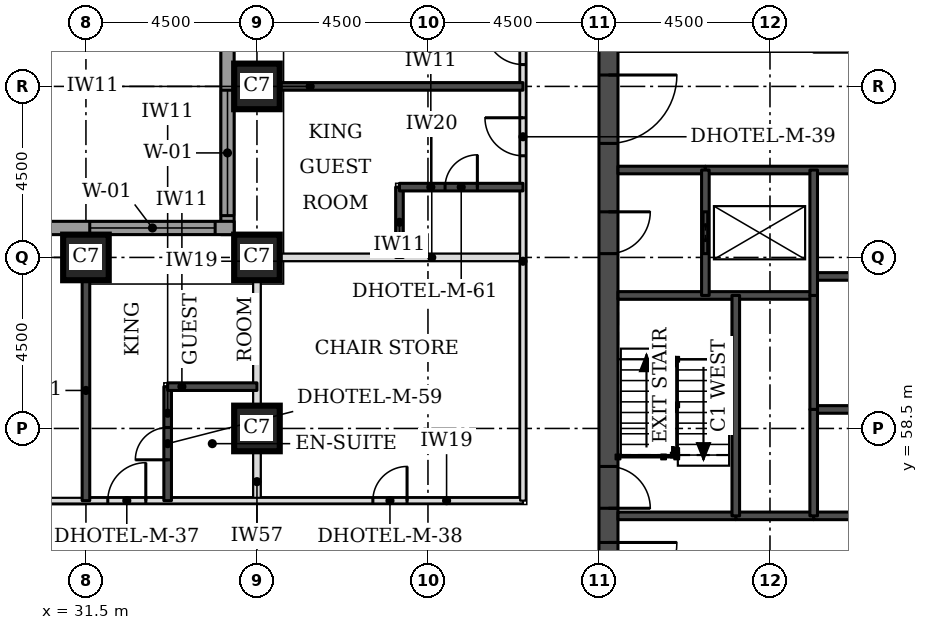
"""IFC4 building model, lengths in metres.
Left out: names, types, materials, properties, quantities, classifications, styles, units other than length and angle.
Written with IfcOpenShell. Run it as: python <this file> out.ifc"""

import sys

from ifc_helpers import new_model, si_unit, direction, frame, frame_2d, origin, origin_2d, place, context, subcontext, project, spatial, rectangle, extrude, element, fill, save


model = new_model("IFC4")
c1 = context("Model", 3, precision=1e-05, world=origin(), true_north=direction((0.0, 1.0)))
c2 = subcontext(c1, "Body", "Model", "MODEL_VIEW")
j1 = project(units=[si_unit("LENGTHUNIT", "METRE"), si_unit("PLANEANGLEUNIT", "RADIAN")], contexts=[c1])
p1 = place(None, origin())
s1 = spatial("IfcSite", under=j1, at=p1, CompositionType="ELEMENT")
p2 = place(p1, origin())
s2 = spatial("IfcBuilding", under=s1, at=p2, CompositionType="ELEMENT")
p3 = place(p2, frame((0.0, 0.0, 23.1)))
s3 = spatial("IfcBuildingStorey", under=s2, at=p3, CompositionType="ELEMENT", Elevation=23.1)
for number, where, z_axis, x_axis in (
    (1, (36.0, 58.5, 0.0), (0.0, 0.0, 1.0), (1.0, 0.0, 0.0)),
    (2, (31.5, 63.0, 0.0), (0.0, 0.0, 1.0), (1.0, 0.0, 0.0)),
    (3, (36.0, 63.0, 0.0), (0.0, 0.0, 1.0), (1.0, 0.0, 0.0)),
    (4, (36.0, 67.5, 0.0), (0.0, 0.0, 1.0), (1.0, 0.0, 0.0)),
):
    element("IfcColumn", number, at=place(p3, frame(where, z_axis=z_axis, x_axis=x_axis)), inside=s3, PredefinedType="COLUMN", context=c2, shape_type="SweptSolid", body=[
        extrude(rectangle(XDim=1.2, YDim=1.2, at=origin_2d()), origin(), (0.0, 0.0, 1.0), 3.3),
    ])
p4 = place(p3, frame((45.25, 49.5, 0.0), z_axis=(0.0, 0.0, 1.0), x_axis=(0.0, 1.0, 0.0)))
e5 = element("IfcWall", 5, at=p4, inside=s3, PredefinedType="SHEAR", context=c2, shape_type="SweptSolid", body=[
    extrude(rectangle(XDim=22.5, YDim=0.5, at=frame_2d((11.25, 0.0))), origin(), (0.0, 0.0, 1.0), 3.3),
])
p5 = place(p4, frame((4.2, 0.0, 0.0)))
e6 = element("IfcOpeningElement", 6, at=p5, cuts=e5, PredefinedType="OPENING", context=c2, shape_type="SweptSolid", body=[
    extrude(rectangle(XDim=1.8, YDim=2.1, at=frame_2d((0.9, 1.05))), frame((0.0, 0.26, 0.0), z_axis=(0.0, -1.0, 0.0), x_axis=(1.0, 0.0, 0.0)), (0.0, 0.0, 1.0), 0.52),
])
p6 = place(p4, frame((6.9, 0.0, 0.0)))
e7 = element("IfcOpeningElement", 7, at=p6, cuts=e5, PredefinedType="OPENING", context=c2, shape_type="SweptSolid", body=[
    extrude(rectangle(XDim=1.1, YDim=2.1, at=frame_2d((0.55, 1.05))), frame((0.0, 0.26, 0.0), z_axis=(0.0, -1.0, 0.0), x_axis=(1.0, 0.0, 0.0)), (0.0, 0.0, 1.0), 0.52),
])
p7 = place(p4, frame((13.6, 0.0, 0.0)))
e8 = element("IfcOpeningElement", 8, at=p7, cuts=e5, PredefinedType="OPENING", context=c2, shape_type="SweptSolid", body=[
    extrude(rectangle(XDim=1.1, YDim=2.1, at=frame_2d((0.55, 1.05))), frame((0.0, 0.26, 0.0), z_axis=(0.0, -1.0, 0.0), x_axis=(1.0, 0.0, 0.0)), (0.0, 0.0, 1.0), 0.52),
])
p8 = place(p4, frame((16.5, 0.0, 0.0)))
e9 = element("IfcOpeningElement", 9, at=p8, cuts=e5, PredefinedType="OPENING", context=c2, shape_type="SweptSolid", body=[
    extrude(rectangle(XDim=1.8, YDim=2.1, at=frame_2d((0.9, 1.05))), frame((0.0, 0.26, 0.0), z_axis=(0.0, -1.0, 0.0), x_axis=(1.0, 0.0, 0.0)), (0.0, 0.0, 1.0), 0.52),
])
p9 = place(p3, frame((35.225, 76.894, 0.0), z_axis=(0.0, 0.0, 1.0), x_axis=(0.0, -1.0, 0.0)))
e10 = element("IfcWall", 10, at=p9, inside=s3, PredefinedType="STANDARD", context=c2, shape_type="SweptSolid", body=[
    extrude(rectangle(XDim=13.293, YDim=0.35, at=frame_2d((6.647, 0.0))), origin(), (0.0, 0.0, 1.0), 3.055),
])
p10 = place(p9, frame((9.493, 0.0, 0.8)))
e11 = element("IfcOpeningElement", 11, at=p10, cuts=e10, PredefinedType="OPENING", context=c2, shape_type="SweptSolid", body=[
    extrude(rectangle(XDim=3.3, YDim=1.5, at=frame_2d((1.65, 0.75))), frame((0.0, 0.185, 0.0), z_axis=(0.0, -1.0, 0.0), x_axis=(1.0, 0.0, 0.0)), (0.0, 0.0, 1.0), 0.37),
])
p11 = place(p3, frame((35.4, 63.775, 0.0), z_axis=(0.0, 0.0, 1.0), x_axis=(-1.0, 0.0, 0.0)))
e12 = element("IfcWall", 12, at=p11, inside=s3, PredefinedType="STANDARD", context=c2, shape_type="SweptSolid", body=[
    extrude(rectangle(XDim=17.793, YDim=0.35, at=frame_2d((8.897, 0.0))), origin(), (0.0, 0.0, 1.0), 3.055),
])
p12 = place(p11, frame((0.5, 0.0, 0.8)))
e13 = element("IfcOpeningElement", 13, at=p12, cuts=e12, PredefinedType="OPENING", context=c2, shape_type="SweptSolid", body=[
    extrude(rectangle(XDim=3.3, YDim=1.5, at=frame_2d((1.65, 0.75))), frame((0.0, 0.185, 0.0), z_axis=(0.0, -1.0, 0.0), x_axis=(1.0, 0.0, 0.0)), (0.0, 0.0, 1.0), 0.37),
])
p13 = place(p11, frame((9.0, 0.0, 0.8)))
e14 = element("IfcOpeningElement", 14, at=p13, cuts=e12, PredefinedType="OPENING", context=c2, shape_type="SweptSolid", body=[
    extrude(rectangle(XDim=3.3, YDim=1.5, at=frame_2d((1.65, 0.75))), frame((0.0, 0.185, 0.0), z_axis=(0.0, -1.0, 0.0), x_axis=(1.0, 0.0, 0.0)), (0.0, 0.0, 1.0), 0.37),
])
p14 = place(p3, frame((36.0, 56.6, 0.0), z_axis=(0.0, 0.0, 1.0), x_axis=(0.0, 1.0, 0.0)))
e15 = element("IfcWall", 15, at=p14, inside=s3, PredefinedType="PARTITIONING", context=c2, shape_type="SweptSolid", body=[
    extrude(rectangle(XDim=5.8, YDim=0.2, at=frame_2d((2.9, 0.0))), origin(), (0.0, 0.0, 1.0), 2.33),
])
p15 = place(p3, frame((36.6, 63.0, 0.0), z_axis=(0.0, 0.0, 1.0), x_axis=(1.0, 0.0, 0.0)))
e16 = element("IfcWall", 16, at=p15, inside=s3, PredefinedType="PARTITIONING", context=c2, shape_type="SweptSolid", body=[
    extrude(rectangle(XDim=6.4, YDim=0.2, at=frame_2d((3.2, 0.0))), origin(), (0.0, 0.0, 1.0), 3.08),
])
p16 = place(p3, frame((29.38, 56.6, 0.0), z_axis=(0.0, 0.0, 1.0), x_axis=(1.0, 0.0, 0.0)))
e17 = element("IfcWall", 17, at=p16, inside=s3, PredefinedType="PARTITIONING", context=c2, shape_type="SweptSolid", body=[
    extrude(rectangle(XDim=13.62, YDim=0.15, at=frame_2d((6.81, 0.0))), origin(), (0.0, 0.0, 1.0), 3.08),
])
p17 = place(p16, frame((2.695, 0.0, 0.0)))
e18 = element("IfcOpeningElement", 18, at=p17, cuts=e17, PredefinedType="OPENING", context=c2, shape_type="SweptSolid", body=[
    extrude(rectangle(XDim=1.0, YDim=2.1, at=frame_2d((0.5, 1.05))), frame((0.0, 0.085, 0.0), z_axis=(0.0, -1.0, 0.0), x_axis=(1.0, 0.0, 0.0)), (0.0, 0.0, 1.0), 0.17),
])
p18 = place(p16, frame((9.67, 0.0, 0.0)))
e19 = element("IfcOpeningElement", 19, at=p18, cuts=e17, PredefinedType="OPENING", context=c2, shape_type="SweptSolid", body=[
    extrude(rectangle(XDim=0.9, YDim=2.1, at=frame_2d((0.45, 1.05))), frame((0.0, 0.085, 0.0), z_axis=(0.0, -1.0, 0.0), x_axis=(1.0, 0.0, 0.0)), (0.0, 0.0, 1.0), 0.17),
])
p19 = place(p3, frame((43.0, 56.6, 0.0), z_axis=(0.0, 0.0, 1.0), x_axis=(0.0, 1.0, 0.0)))
e20 = element("IfcWall", 20, at=p19, inside=s3, PredefinedType="PARTITIONING", context=c2, shape_type="SweptSolid", body=[
    extrude(rectangle(XDim=17.4, YDim=0.15, at=frame_2d((8.7, 0.0))), origin(), (0.0, 0.0, 1.0), 3.08),
])
p20 = place(p19, frame((9.075, 0.0, 0.0)))
e21 = element("IfcOpeningElement", 21, at=p20, cuts=e20, PredefinedType="OPENING", context=c2, shape_type="SweptSolid", body=[
    extrude(rectangle(XDim=1.0, YDim=2.1, at=frame_2d((0.5, 1.05))), frame((0.0, 0.085, 0.0), z_axis=(0.0, -1.0, 0.0), x_axis=(1.0, 0.0, 0.0)), (0.0, 0.0, 1.0), 0.17),
])
p21 = place(p19, frame((11.475, 0.0, 0.0)))
e22 = element("IfcOpeningElement", 22, at=p21, cuts=e20, PredefinedType="OPENING", context=c2, shape_type="SweptSolid", body=[
    extrude(rectangle(XDim=1.0, YDim=2.1, at=frame_2d((0.5, 1.05))), frame((0.0, 0.085, 0.0), z_axis=(0.0, -1.0, 0.0), x_axis=(1.0, 0.0, 0.0)), (0.0, 0.0, 1.0), 0.17),
])
p22 = place(p19, frame((15.953, 0.0, 0.0)))
e23 = element("IfcOpeningElement", 23, at=p22, cuts=e20, PredefinedType="OPENING", context=c2, shape_type="SweptSolid", body=[
    extrude(rectangle(XDim=1.0, YDim=2.1, at=frame_2d((0.5, 1.05))), frame((0.0, 0.085, 0.0), z_axis=(0.0, -1.0, 0.0), x_axis=(1.0, 0.0, 0.0)), (0.0, 0.0, 1.0), 0.17),
])
p23 = place(p3, frame((31.5, 56.6, 0.0), z_axis=(0.0, 0.0, 1.0), x_axis=(0.0, 1.0, 0.0)))
e24 = element("IfcWall", 24, at=p23, inside=s3, PredefinedType="SOLIDWALL", context=c2, shape_type="SweptSolid", body=[
    extrude(rectangle(XDim=5.8, YDim=0.2, at=frame_2d((2.9, 0.0))), origin(), (0.0, 0.0, 1.0), 3.08),
])
p24 = place(p3, frame((33.65, 56.6, 0.0), z_axis=(0.0, 0.0, 1.0), x_axis=(0.0, 1.0, 0.0)))
e25 = element("IfcWall", 25, at=p24, inside=s3, PredefinedType="SOLIDWALL", context=c2, shape_type="SweptSolid", body=[
    extrude(rectangle(XDim=3.0, YDim=0.2, at=frame_2d((1.5, 0.0))), origin(), (0.0, 0.0, 1.0), 3.08),
])
p25 = place(p24, frame((1.075, 0.0, 0.0)))
e26 = element("IfcOpeningElement", 26, at=p25, cuts=e25, PredefinedType="OPENING", context=c2, shape_type="SweptSolid", body=[
    extrude(rectangle(XDim=0.85, YDim=2.1, at=frame_2d((0.425, 1.05))), frame((0.0, 0.11, 0.0), z_axis=(0.0, -1.0, 0.0), x_axis=(1.0, 0.0, 0.0)), (0.0, 0.0, 1.0), 0.22),
])
p26 = place(p3, frame((33.65, 59.6, 0.0), z_axis=(0.0, 0.0, 1.0), x_axis=(1.0, 0.0, 0.0)))
e27 = element("IfcWall", 27, at=p26, inside=s3, PredefinedType="SOLIDWALL", context=c2, shape_type="SweptSolid", body=[
    extrude(rectangle(XDim=2.35, YDim=0.2, at=frame_2d((1.175, 0.0))), origin(), (0.0, 0.0, 1.0), 3.08),
])
p27 = place(p3, frame((39.75, 63.0, 0.0), z_axis=(0.0, 0.0, 1.0), x_axis=(0.0, 1.0, 0.0)))
e28 = element("IfcWall", 28, at=p27, inside=s3, PredefinedType="SOLIDWALL", context=c2, shape_type="SweptSolid", body=[
    extrude(rectangle(XDim=1.85, YDim=0.2, at=frame_2d((0.925, 0.0))), origin(), (0.0, 0.0, 1.0), 3.08),
])
p28 = place(p3, frame((39.75, 64.85, 0.0), z_axis=(0.0, 0.0, 1.0), x_axis=(1.0, 0.0, 0.0)))
e29 = element("IfcWall", 29, at=p28, inside=s3, PredefinedType="SOLIDWALL", context=c2, shape_type="SweptSolid", body=[
    extrude(rectangle(XDim=3.25, YDim=0.2, at=frame_2d((1.625, 0.0))), origin(), (0.0, 0.0, 1.0), 3.08),
])
p29 = place(p28, frame((1.2, 0.0, 0.0)))
e30 = element("IfcOpeningElement", 30, at=p29, cuts=e29, PredefinedType="OPENING", context=c2, shape_type="SweptSolid", body=[
    extrude(rectangle(XDim=0.85, YDim=2.1, at=frame_2d((0.425, 1.05))), frame((0.0, 0.11, 0.0), z_axis=(0.0, -1.0, 0.0), x_axis=(1.0, 0.0, 0.0)), (0.0, 0.0, 1.0), 0.22),
])
p30 = place(p3, frame((36.6, 67.5, 0.0), z_axis=(0.0, 0.0, 1.0), x_axis=(1.0, 0.0, 0.0)))
e31 = element("IfcWall", 31, at=p30, inside=s3, PredefinedType="SOLIDWALL", context=c2, shape_type="SweptSolid", body=[
    extrude(rectangle(XDim=6.4, YDim=0.2, at=frame_2d((3.2, 0.0))), origin(), (0.0, 0.0, 1.0), 3.08),
])
p31 = place(p3, frame((48.6, 56.2, 0.0), z_axis=(0.0, 0.0, 1.0), x_axis=(1.0, 0.0, 0.0)))
e32 = element("IfcWall", 32, at=p31, inside=s3, PredefinedType="SOLIDWALL", context=c2, shape_type="SweptSolid", body=[
    extrude(rectangle(XDim=2.05, YDim=0.2, at=frame_2d((1.025, 0.0))), origin(), (0.0, 0.0, 1.0), 3.08),
])
p32 = place(p3, frame((45.5, 56.2, 0.0), z_axis=(0.0, 0.0, 1.0), x_axis=(1.0, 0.0, 0.0)))
e33 = element("IfcWall", 33, at=p32, inside=s3, PredefinedType="SOLIDWALL", context=c2, shape_type="SweptSolid", body=[
    extrude(rectangle(XDim=3.1, YDim=0.2, at=frame_2d((1.55, 0.0))), origin(), (0.0, 0.0, 1.0), 3.08),
])
p33 = place(p3, frame((50.65, 56.2, 0.0), z_axis=(0.0, 0.0, 1.0), x_axis=(1.0, 0.0, 0.0)))
e34 = element("IfcWall", 34, at=p33, inside=s3, PredefinedType="SOLIDWALL", context=c2, shape_type="SweptSolid", body=[
    extrude(rectangle(XDim=11.2, YDim=0.2, at=frame_2d((5.6, 0.0))), origin(), (0.0, 0.0, 1.0), 3.08),
])
p34 = place(p3, frame((50.65, 59.0, 0.0), z_axis=(0.0, 0.0, 1.0), x_axis=(1.0, 0.0, 0.0)))
e35 = element("IfcWall", 35, at=p34, inside=s3, PredefinedType="SOLIDWALL", context=c2, shape_type="SweptSolid", body=[
    extrude(rectangle(XDim=11.2, YDim=0.2, at=frame_2d((5.6, 0.0))), origin(), (0.0, 0.0, 1.0), 3.3),
])
p35 = place(p3, frame((45.5, 62.0, 0.0), z_axis=(0.0, 0.0, 1.0), x_axis=(1.0, 0.0, 0.0)))
e36 = element("IfcWall", 36, at=p35, inside=s3, PredefinedType="SOLIDWALL", context=c2, shape_type="SweptSolid", body=[
    extrude(rectangle(XDim=5.15, YDim=0.2, at=frame_2d((2.575, 0.0))), origin(), (0.0, 0.0, 1.0), 3.08),
])
p36 = place(p3, frame((50.65, 62.5, 0.0), z_axis=(0.0, 0.0, 1.0), x_axis=(1.0, 0.0, 0.0)))
e37 = element("IfcWall", 37, at=p36, inside=s3, PredefinedType="SOLIDWALL", context=c2, shape_type="SweptSolid", body=[
    extrude(rectangle(XDim=11.2, YDim=0.2, at=frame_2d((5.6, 0.0))), origin(), (0.0, 0.0, 1.0), 3.3),
])
p37 = place(p3, frame((45.5, 65.3, 0.0), z_axis=(0.0, 0.0, 1.0), x_axis=(1.0, 0.0, 0.0)))
e38 = element("IfcWall", 38, at=p37, inside=s3, PredefinedType="SOLIDWALL", context=c2, shape_type="SweptSolid", body=[
    extrude(rectangle(XDim=2.3, YDim=0.2, at=frame_2d((1.15, 0.0))), origin(), (0.0, 0.0, 1.0), 3.08),
])
p38 = place(p3, frame((47.8, 65.3, 0.0), z_axis=(0.0, 0.0, 1.0), x_axis=(1.0, 0.0, 0.0)))
e39 = element("IfcWall", 39, at=p38, inside=s3, PredefinedType="SOLIDWALL", context=c2, shape_type="SweptSolid", body=[
    extrude(rectangle(XDim=16.9, YDim=0.2, at=frame_2d((8.45, 0.0))), origin(), (0.0, 0.0, 1.0), 3.08),
])
p39 = place(p3, frame((47.8, 62.0, 0.0), z_axis=(0.0, 0.0, 1.0), x_axis=(0.0, 1.0, 0.0)))
e40 = element("IfcWall", 40, at=p39, inside=s3, PredefinedType="SOLIDWALL", context=c2, shape_type="SweptSolid", body=[
    extrude(rectangle(XDim=3.3, YDim=0.2, at=frame_2d((1.65, 0.0))), origin(), (0.0, 0.0, 1.0), 3.08),
])
p40 = place(p39, frame((1.1, 0.0, 0.0)))
e41 = element("IfcOpeningElement", 41, at=p40, cuts=e40, PredefinedType="OPENING", context=c2, shape_type="SweptSolid", body=[
    extrude(rectangle(XDim=1.1, YDim=2.1, at=frame_2d((0.55, 1.05))), frame((0.0, 0.11, 0.0), z_axis=(0.0, -1.0, 0.0), x_axis=(1.0, 0.0, 0.0)), (0.0, 0.0, 1.0), 0.22),
])
p41 = place(p3, frame((48.6, 56.2, 0.0), z_axis=(0.0, 0.0, 1.0), x_axis=(0.0, 1.0, 0.0)))
e42 = element("IfcWall", 42, at=p41, inside=s3, PredefinedType="SOLIDWALL", context=c2, shape_type="SweptSolid", body=[
    extrude(rectangle(XDim=5.8, YDim=0.2, at=frame_2d((2.9, 0.0))), origin(), (0.0, 0.0, 1.0), 3.08),
])
p42 = place(p3, frame((50.65, 59.0, 0.0), z_axis=(0.0, 0.0, 1.0), x_axis=(0.0, 1.0, 0.0)))
e43 = element("IfcWall", 43, at=p42, inside=s3, PredefinedType="SOLIDWALL", context=c2, shape_type="SweptSolid", body=[
    extrude(rectangle(XDim=3.0, YDim=0.2, at=frame_2d((1.5, 0.0))), origin(), (0.0, 0.0, 1.0), 3.3),
])
p43 = place(p3, frame((50.65, 56.2, 0.0), z_axis=(0.0, 0.0, 1.0), x_axis=(0.0, 1.0, 0.0)))
e44 = element("IfcWall", 44, at=p43, inside=s3, PredefinedType="SOLIDWALL", context=c2, shape_type="SweptSolid", body=[
    extrude(rectangle(XDim=2.8, YDim=0.2, at=frame_2d((1.4, 0.0))), origin(), (0.0, 0.0, 1.0), 3.08),
])
p44 = place(p3, frame((50.65, 62.0, 0.0), z_axis=(0.0, 0.0, 1.0), x_axis=(0.0, 1.0, 0.0)))
e45 = element("IfcWall", 45, at=p44, inside=s3, PredefinedType="SOLIDWALL", context=c2, shape_type="SweptSolid", body=[
    extrude(rectangle(XDim=3.3, YDim=0.2, at=frame_2d((1.65, 0.0))), origin(), (0.0, 0.0, 1.0), 3.08),
])
p45 = place(p10, origin())
e46 = element("IfcWindow", 46, at=p45, inside=s3, PartitioningType="SINGLE_PANEL", PredefinedType="WINDOW", context=c2, shape_type="SweptSolid", body=[
    extrude(rectangle(XDim=3.3, YDim=1.5, at=frame_2d((1.65, 0.75))), frame((0.0, 0.085, 0.0), z_axis=(0.0, -1.0, 0.0), x_axis=(1.0, 0.0, 0.0)), (0.0, 0.0, 1.0), 0.06),
])
fill(e11, e46)
p46 = place(p12, origin())
e47 = element("IfcWindow", 47, at=p46, inside=s3, PartitioningType="SINGLE_PANEL", PredefinedType="WINDOW", context=c2, shape_type="SweptSolid", body=[
    extrude(rectangle(XDim=3.3, YDim=1.5, at=frame_2d((1.65, 0.75))), frame((0.0, 0.085, 0.0), z_axis=(0.0, -1.0, 0.0), x_axis=(1.0, 0.0, 0.0)), (0.0, 0.0, 1.0), 0.06),
])
fill(e13, e47)
p47 = place(p17, origin())
e48 = element("IfcDoor", 48, at=p47, inside=s3, OperationType="SINGLE_SWING_RIGHT", PredefinedType="DOOR", context=c2, shape_type="SweptSolid", body=[
    extrude(rectangle(XDim=1.0, YDim=2.1, at=frame_2d((0.5, 1.05))), frame((0.0, 0.025, 0.0), z_axis=(0.0, -1.0, 0.0), x_axis=(1.0, 0.0, 0.0)), (0.0, 0.0, 1.0), 0.05),
])
fill(e18, e48)
p48 = place(p25, origin())
e49 = element("IfcDoor", 49, at=p48, inside=s3, OperationType="SINGLE_SWING_LEFT", PredefinedType="DOOR", context=c2, shape_type="SweptSolid", body=[
    extrude(rectangle(XDim=0.85, YDim=2.1, at=frame_2d((0.425, 1.05))), frame((0.0, 0.025, 0.0), z_axis=(0.0, -1.0, 0.0), x_axis=(1.0, 0.0, 0.0)), (0.0, 0.0, 1.0), 0.05),
])
fill(e26, e49)
p49 = place(p20, origin())
e50 = element("IfcDoor", 50, at=p49, inside=s3, OperationType="SINGLE_SWING_RIGHT", PredefinedType="DOOR", context=c2, shape_type="SweptSolid", body=[
    extrude(rectangle(XDim=1.0, YDim=2.1, at=frame_2d((0.5, 1.05))), frame((0.0, 0.025, 0.0), z_axis=(0.0, -1.0, 0.0), x_axis=(1.0, 0.0, 0.0)), (0.0, 0.0, 1.0), 0.05),
])
fill(e21, e50)
p50 = place(p29, origin())
e51 = element("IfcDoor", 51, at=p50, inside=s3, OperationType="SINGLE_SWING_RIGHT", PredefinedType="DOOR", context=c2, shape_type="SweptSolid", body=[
    extrude(rectangle(XDim=0.85, YDim=2.1, at=frame_2d((0.425, 1.05))), frame((0.0, 0.025, 0.0), z_axis=(0.0, -1.0, 0.0), x_axis=(1.0, 0.0, 0.0)), (0.0, 0.0, 1.0), 0.05),
])
fill(e30, e51)
p51 = place(p21, origin())
e52 = element("IfcDoor", 52, at=p51, inside=s3, OperationType="SINGLE_SWING_RIGHT", PredefinedType="DOOR", context=c2, shape_type="SweptSolid", body=[
    extrude(rectangle(XDim=1.0, YDim=2.1, at=frame_2d((0.5, 1.05))), frame((0.0, 0.025, 0.0), z_axis=(0.0, -1.0, 0.0), x_axis=(1.0, 0.0, 0.0)), (0.0, 0.0, 1.0), 0.05),
])
fill(e22, e52)
p52 = place(p18, origin())
e53 = element("IfcDoor", 53, at=p52, inside=s3, OperationType="SINGLE_SWING_RIGHT", PredefinedType="DOOR", context=c2, shape_type="SweptSolid", body=[
    extrude(rectangle(XDim=0.9, YDim=2.1, at=frame_2d((0.45, 1.05))), frame((0.0, 0.025, 0.0), z_axis=(0.0, -1.0, 0.0), x_axis=(1.0, 0.0, 0.0)), (0.0, 0.0, 1.0), 0.05),
])
fill(e19, e53)
p53 = place(p40, origin())
e54 = element("IfcDoor", 54, at=p53, inside=s3, OperationType="DOUBLE_DOOR_SLIDING", PredefinedType="DOOR", context=c2, shape_type="SweptSolid", body=[
    extrude(rectangle(XDim=1.1, YDim=2.1, at=frame_2d((0.55, 1.05))), frame((0.0, 0.025, 0.0), z_axis=(0.0, -1.0, 0.0), x_axis=(1.0, 0.0, 0.0)), (0.0, 0.0, 1.0), 0.05),
])
fill(e41, e54)
p54 = place(p5, frame((1.8, 0.0, 0.0), z_axis=(0.0, 0.0, 1.0), x_axis=(-1.0, 0.0, 0.0)))
e55 = element("IfcDoor", 55, at=p54, inside=s3, OperationType="SINGLE_SWING_LEFT", PredefinedType="DOOR", context=c2, shape_type="SweptSolid", body=[
    extrude(rectangle(XDim=1.8, YDim=2.1, at=frame_2d((0.9, 1.05))), frame((0.0, 0.025, 0.0), z_axis=(0.0, -1.0, 0.0), x_axis=(1.0, 0.0, 0.0)), (0.0, 0.0, 1.0), 0.05),
])
fill(e6, e55)
p55 = place(p6, frame((1.1, 0.0, 0.0), z_axis=(0.0, 0.0, 1.0), x_axis=(-1.0, 0.0, 0.0)))
e56 = element("IfcDoor", 56, at=p55, inside=s3, OperationType="SINGLE_SWING_RIGHT", PredefinedType="DOOR", context=c2, shape_type="SweptSolid", body=[
    extrude(rectangle(XDim=1.1, YDim=2.1, at=frame_2d((0.55, 1.05))), frame((0.0, 0.025, 0.0), z_axis=(0.0, -1.0, 0.0), x_axis=(1.0, 0.0, 0.0)), (0.0, 0.0, 1.0), 0.05),
])
fill(e7, e56)
p56 = place(p7, frame((1.1, 0.0, 0.0), z_axis=(0.0, 0.0, 1.0), x_axis=(-1.0, 0.0, 0.0)))
e57 = element("IfcDoor", 57, at=p56, inside=s3, OperationType="SINGLE_SWING_LEFT", PredefinedType="DOOR", context=c2, shape_type="SweptSolid", body=[
    extrude(rectangle(XDim=1.1, YDim=2.1, at=frame_2d((0.55, 1.05))), frame((0.0, 0.025, 0.0), z_axis=(0.0, -1.0, 0.0), x_axis=(1.0, 0.0, 0.0)), (0.0, 0.0, 1.0), 0.05),
])
fill(e8, e57)
p57 = place(p8, frame((1.8, 0.0, 0.0), z_axis=(0.0, 0.0, 1.0), x_axis=(-1.0, 0.0, 0.0)))
e58 = element("IfcDoor", 58, at=p57, inside=s3, OperationType="SINGLE_SWING_LEFT", PredefinedType="DOOR", context=c2, shape_type="SweptSolid", body=[
    extrude(rectangle(XDim=1.8, YDim=2.1, at=frame_2d((0.9, 1.05))), frame((0.0, 0.025, 0.0), z_axis=(0.0, -1.0, 0.0), x_axis=(1.0, 0.0, 0.0)), (0.0, 0.0, 1.0), 0.05),
])
fill(e9, e58)
save(model, sys.argv[1])
